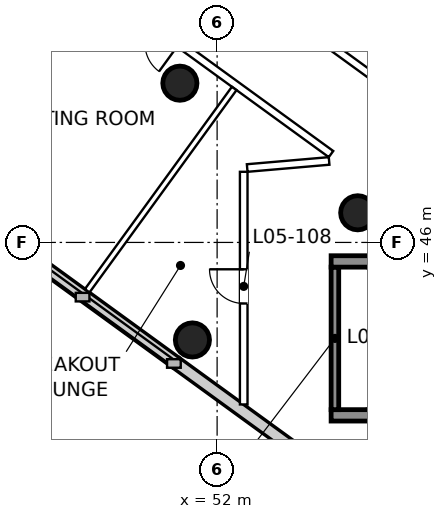
"""IFC4 building model, lengths in metres.
Left out: names, types, materials, properties, quantities, classifications, styles, units other than length and angle.
Written with IfcOpenShell. Run it as: python <this file> out.ifc"""

import sys

from ifc_helpers import new_model, si_unit, direction, frame, frame_2d, origin, origin_2d, place, context, subcontext, project, spatial, rectangle, circle, extrude, element, fill, save


model = new_model("IFC4")
c1 = context("Model", 3, precision=1e-05, world=origin(), true_north=direction((0.0, 1.0)))
c2 = subcontext(c1, "Body", "Model", "MODEL_VIEW")
j1 = project(units=[si_unit("LENGTHUNIT", "METRE"), si_unit("PLANEANGLEUNIT", "RADIAN")], contexts=[c1])
p1 = place(None, origin())
s1 = spatial("IfcSite", under=j1, at=p1, CompositionType="ELEMENT")
p2 = place(p1, origin())
s2 = spatial("IfcBuilding", under=s1, at=p2, CompositionType="ELEMENT")
p3 = place(p2, frame((0.0, 0.0, 34.0)))
s3 = spatial("IfcBuildingStorey", under=s2, at=p3, CompositionType="ELEMENT", Elevation=34.0)
for number, where, z_axis, x_axis in (
    (1, (51.02, 50.19, 0.0), (0.0, 0.0, 1.0), (1.0, 0.0, 0.0)),
    (2, (55.7, 46.78, 0.0), (0.0, 0.0, 1.0), (1.0, 0.0, 0.0)),
    (3, (51.35, 43.434, 0.0), (0.0, 0.0, 1.0), (1.0, 0.0, 0.0)),
):
    element("IfcColumn", number, at=place(p3, frame(where, z_axis=z_axis, x_axis=x_axis)), inside=s3, PredefinedType="COLUMN", context=c2, shape_type="SweptSolid", body=[
        extrude(circle(Radius=0.45, at=origin_2d()), origin(), (0.0, 0.0, 1.0), 5.0),
    ])
p4 = place(p3, frame((43.634, 48.126, 0.0), z_axis=(0.0, 0.0, 1.0), x_axis=(0.808999938455, -0.587808727036, 0.0)))
e4 = element("IfcWall", 4, at=p4, inside=s3, PredefinedType="SOLIDWALL", context=c2, shape_type="SweptSolid", body=[
    extrude(rectangle(XDim=9.0, YDim=0.32, at=frame_2d((4.5, 0.0))), origin(), (0.0, 0.0, 1.0), 0.9),
])
p5 = place(p3, frame((50.915, 42.836, 0.0), z_axis=(0.0, 0.0, 1.0), x_axis=(0.809022210299, -0.587778073121, 0.0)))
e5 = element("IfcWall", 5, at=p5, inside=s3, PredefinedType="SOLIDWALL", context=c2, shape_type="SweptSolid", body=[
    extrude(rectangle(XDim=9.0, YDim=0.32, at=frame_2d((4.5, 0.0))), origin(), (0.0, 0.0, 1.0), 4.6),
])
p6 = place(p3, frame((55.0, 41.45, 0.0), z_axis=(0.0, 0.0, 1.0), x_axis=(1.0, 0.0, 0.0)))
e6 = element("IfcWall", 6, at=p6, inside=s3, PredefinedType="SHEAR", context=c2, shape_type="SweptSolid", body=[
    extrude(rectangle(XDim=11.9, YDim=0.3, at=frame_2d((5.95, 0.0))), origin(), (0.0, 0.0, 1.0), 5.0),
])
p7 = place(p3, frame((55.1, 41.6, 0.0), z_axis=(0.0, 0.0, 1.0), x_axis=(0.0, 1.0, 0.0)))
e7 = element("IfcWall", 7, at=p7, inside=s3, PredefinedType="SHEAR", context=c2, shape_type="SweptSolid", body=[
    extrude(rectangle(XDim=3.75, YDim=0.2, at=frame_2d((1.875, 0.0))), origin(), (0.0, 0.0, 1.0), 5.0),
])
p8 = place(p3, frame((55.0, 45.5, 0.0), z_axis=(0.0, 0.0, 1.0), x_axis=(1.0, 0.0, 0.0)))
e8 = element("IfcWall", 8, at=p8, inside=s3, PredefinedType="SHEAR", context=c2, shape_type="SweptSolid", body=[
    extrude(rectangle(XDim=11.9, YDim=0.3, at=frame_2d((5.95, 0.0))), origin(), (0.0, 0.0, 1.0), 5.0),
])
p9 = place(p8, frame((1.45, 0.0, 0.0)))
e9 = element("IfcOpeningElement", 9, at=p9, cuts=e8, PredefinedType="OPENING", context=c2, shape_type="SweptSolid", body=[
    extrude(rectangle(XDim=1.1, YDim=2.1, at=frame_2d((0.55, 1.05))), frame((0.0, 0.16, 0.0), z_axis=(0.0, -1.0, 0.0), x_axis=(1.0, 0.0, 0.0)), (0.0, 0.0, 1.0), 0.32),
])
p10 = place(p3, frame((52.7, 41.737, 0.0), z_axis=(0.0, 0.0, 1.0), x_axis=(0.0, 1.0, 0.0)))
e10 = element("IfcWall", 10, at=p10, inside=s3, PredefinedType="PARTITIONING", context=c2, shape_type="SweptSolid", body=[
    extrude(rectangle(XDim=6.122, YDim=0.2, at=frame_2d((3.061, 0.0))), origin(), (0.0, 0.0, 1.0), 3.9),
])
p11 = place(p10, frame((2.656, 0.0, 0.0)))
e11 = element("IfcOpeningElement", 11, at=p11, cuts=e10, PredefinedType="OPENING", context=c2, shape_type="SweptSolid", body=[
    extrude(rectangle(XDim=0.9, YDim=2.1, at=frame_2d((0.45, 1.05))), frame((0.0, 0.11, 0.0), z_axis=(0.0, -1.0, 0.0), x_axis=(1.0, 0.0, 0.0)), (0.0, 0.0, 1.0), 0.22),
])
p12 = place(p3, frame((52.792, 47.958, 0.0), z_axis=(0.0, 0.0, 1.0), x_axis=(0.996286600035, 0.086098841978, 0.0)))
e12 = element("IfcWall", 12, at=p12, inside=s3, PredefinedType="PARTITIONING", context=c2, shape_type="SweptSolid", body=[
    extrude(rectangle(XDim=2.164, YDim=0.2, at=frame_2d((1.082, 0.0))), origin(), (0.0, 0.0, 1.0), 4.1),
])
p13 = place(p3, frame((54.997, 48.325, 0.0), z_axis=(0.0, 0.0, 1.0), x_axis=(-0.809019601086, 0.587781664446, 0.0)))
e13 = element("IfcWall", 13, at=p13, inside=s3, PredefinedType="PARTITIONING", context=c2, shape_type="SweptSolid", body=[
    extrude(rectangle(XDim=7.668, YDim=0.2, at=frame_2d((3.834, 0.0))), origin(), (0.0, 0.0, 1.0), 4.1),
])
p14 = place(p13, frame((4.938, 0.0, 0.0)))
e14 = element("IfcOpeningElement", 14, at=p14, cuts=e13, PredefinedType="OPENING", context=c2, shape_type="SweptSolid", body=[
    extrude(rectangle(XDim=0.9, YDim=2.1, at=frame_2d((0.45, 1.05))), frame((0.0, 0.11, 0.0), z_axis=(0.0, -1.0, 0.0), x_axis=(1.0, 0.0, 0.0)), (0.0, 0.0, 1.0), 0.22),
])
p15 = place(p3, frame((50.75, 54.254, 0.0), z_axis=(0.0, 0.0, 1.0), x_axis=(0.809010498572, -0.587794192894, 0.0)))
e15 = element("IfcWall", 15, at=p15, inside=s3, PredefinedType="PARTITIONING", context=c2, shape_type="SweptSolid", body=[
    extrude(rectangle(XDim=10.692, YDim=0.2, at=frame_2d((5.346, 0.0))), origin(), (0.0, 0.0, 1.0), 4.6),
])
p16 = place(p15, frame((3.62, 0.0, 0.0)))
e16 = element("IfcOpeningElement", 16, at=p16, cuts=e15, PredefinedType="OPENING", context=c2, shape_type="SweptSolid", body=[
    extrude(rectangle(XDim=0.9, YDim=2.1, at=frame_2d((0.45, 1.05))), frame((0.0, 0.11, 0.0), z_axis=(0.0, -1.0, 0.0), x_axis=(1.0, 0.0, 0.0)), (0.0, 0.0, 1.0), 0.22),
])
p17 = place(p3, frame((43.085, 48.723, 0.0), z_axis=(0.0, 0.0, 1.0), x_axis=(0.809006827345, 0.587799245754, 0.0)))
e17 = element("IfcWall", 17, at=p17, inside=s3, PredefinedType="PARTITIONING", context=c2, shape_type="SweptSolid", body=[
    extrude(rectangle(XDim=6.939, YDim=0.15, at=frame_2d((3.469, 0.0))), origin(), (0.0, 0.0, 1.0), 4.6),
])
p18 = place(p3, frame((48.582, 44.729, 0.0), z_axis=(0.0, 0.0, 1.0), x_axis=(0.587778942742, 0.809021578494, 0.0)))
e18 = element("IfcWall", 18, at=p18, inside=s3, PredefinedType="PARTITIONING", context=c2, shape_type="SweptSolid", body=[
    extrude(rectangle(XDim=6.58, YDim=0.15, at=frame_2d((3.29, 0.0))), origin(), (0.0, 0.0, 1.0), 3.9),
])
p19 = place(p11, origin())
e19 = element("IfcDoor", 19, at=p19, inside=s3, OperationType="SINGLE_SWING_RIGHT", PredefinedType="DOOR", context=c2, shape_type="SweptSolid", body=[
    extrude(rectangle(XDim=0.9, YDim=2.1, at=frame_2d((0.45, 1.05))), frame((0.0, 0.025, 0.0), z_axis=(0.0, -1.0, 0.0), x_axis=(1.0, 0.0, 0.0)), (0.0, 0.0, 1.0), 0.05),
])
fill(e11, e19)
save(model, sys.argv[1])
